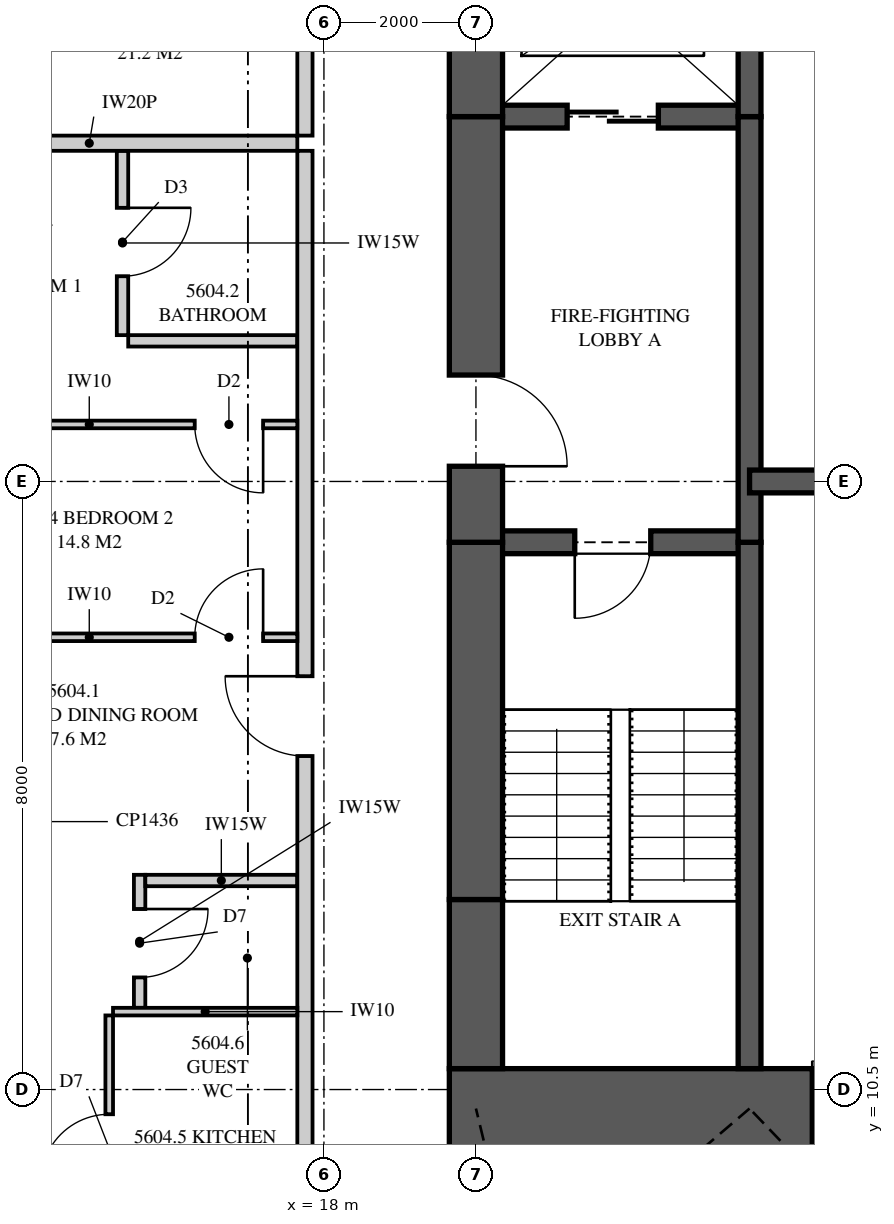
"""IFC4 building model, lengths in metres.
Left out: names, types, materials, properties, quantities, classifications, styles, units other than length and angle.
Written with IfcOpenShell. Run it as: python <this file> out.ifc"""

import sys

from ifc_helpers import new_model, si_unit, direction, frame, frame_2d, origin, place, context, subcontext, project, spatial, polyline, rectangle, outline, extrude, element, fill, save


model = new_model("IFC4")
c1 = context("Model", 3, precision=1e-05, world=origin(), true_north=direction((0.0, 1.0)))
c2 = subcontext(c1, "Body", "Model", "MODEL_VIEW")
j1 = project(units=[si_unit("LENGTHUNIT", "METRE"), si_unit("PLANEANGLEUNIT", "RADIAN")], contexts=[c1])
p1 = place(None, origin())
s1 = spatial("IfcSite", under=j1, at=p1, CompositionType="ELEMENT")
p2 = place(p1, origin())
s2 = spatial("IfcBuilding", under=s1, at=p2, CompositionType="ELEMENT")
p3 = place(p2, frame((0.0, 0.0, 204.6)))
s3 = spatial("IfcBuildingStorey", under=s2, at=p3, CompositionType="ELEMENT", Elevation=204.6)
p4 = place(p3, frame((19.65, 10.125, 0.0), z_axis=(0.0, 0.0, 1.0), x_axis=(1.0, 0.0, 0.0)))
e1 = element("IfcWall", 1, at=p4, inside=s3, PredefinedType="SHEAR", context=c2, shape_type="SweptSolid", body=[
    extrude(rectangle(XDim=6.35, YDim=1.3, at=frame_2d((3.175, 0.0))), origin(), (0.0, 0.0, 1.0), 3.35),
])
p5 = place(p4, frame((4.775, 0.0, 0.0)))
e2 = element("IfcOpeningElement", 2, at=p5, cuts=e1, PredefinedType="OPENING", context=c2, shape_type="SweptSolid", body=[
    extrude(rectangle(XDim=0.75, YDim=2.1, at=frame_2d((0.375, 1.05))), frame((0.0, 0.66, 0.0), z_axis=(0.0, -1.0, 0.0), x_axis=(1.0, 0.0, 0.0)), (0.0, 0.0, 1.0), 1.32),
])
p6 = place(p3, frame((20.0, 26.225, 0.0), z_axis=(0.0, 0.0, 1.0), x_axis=(0.0, -1.0, 0.0)))
e3 = element("IfcWall", 3, at=p6, inside=s3, PredefinedType="SHEAR", context=c2, shape_type="SweptSolid", body=[
    extrude(rectangle(XDim=2.925, YDim=0.7, at=frame_2d((1.462, 0.0))), origin(), (0.0, 0.0, 1.0), 3.35),
])
p7 = place(p3, frame((20.0, 23.3, 0.0), z_axis=(0.0, 0.0, 1.0), x_axis=(0.0, -1.0, 0.0)))
e4 = element("IfcWall", 4, at=p7, inside=s3, PredefinedType="SHEAR", context=c2, shape_type="SweptSolid", body=[
    extrude(rectangle(XDim=5.6, YDim=0.7, at=frame_2d((2.8, 0.0))), origin(), (0.0, 0.0, 1.0), 3.35),
])
p8 = place(p7, frame((3.4, 0.0, 0.0)))
e5 = element("IfcOpeningElement", 5, at=p8, cuts=e4, PredefinedType="OPENING", context=c2, shape_type="SweptSolid", body=[
    extrude(rectangle(XDim=1.2, YDim=2.2, at=frame_2d((0.6, 1.1))), frame((0.0, 0.36, 0.0), z_axis=(0.0, -1.0, 0.0), x_axis=(1.0, 0.0, 0.0)), (0.0, 0.0, 1.0), 0.72),
])
p9 = place(p3, frame((20.0, 17.7, 0.0), z_axis=(0.0, 0.0, 1.0), x_axis=(0.0, -1.0, 0.0)))
e6 = element("IfcWall", 6, at=p9, inside=s3, PredefinedType="SHEAR", context=c2, shape_type="SweptSolid", body=[
    extrude(rectangle(XDim=4.7, YDim=0.7, at=frame_2d((2.35, 0.0))), origin(), (0.0, 0.0, 1.0), 3.35),
])
p10 = place(p3, frame((20.0, 13.0, 0.0), z_axis=(0.0, 0.0, 1.0), x_axis=(0.0, -1.0, 0.0)))
e7 = element("IfcWall", 7, at=p10, inside=s3, PredefinedType="SHEAR", context=c2, shape_type="SweptSolid", body=[
    extrude(rectangle(XDim=2.225, YDim=0.7, at=frame_2d((1.113, 0.0))), origin(), (0.0, 0.0, 1.0), 3.35),
])
p11 = place(p3, frame((23.6, 10.775, 0.0), z_axis=(0.0, 0.0, 1.0), x_axis=(0.0, 1.0, 0.0)))
e8 = element("IfcWall", 8, at=p11, inside=s3, PredefinedType="SHEAR", context=c2, shape_type="SweptSolid", body=[
    extrude(rectangle(XDim=6.925, YDim=0.3, at=frame_2d((3.462, 0.0))), origin(), (0.0, 0.0, 1.0), 3.35),
])
p12 = place(p3, frame((23.6, 17.7, 0.0), z_axis=(0.0, 0.0, 1.0), x_axis=(0.0, 1.0, 0.0)))
e9 = element("IfcWall", 9, at=p12, inside=s3, PredefinedType="SHEAR", context=c2, shape_type="SweptSolid", body=[
    extrude(rectangle(XDim=5.6, YDim=0.3, at=frame_2d((2.8, 0.0))), origin(), (0.0, 0.0, 1.0), 3.35),
])
p13 = place(p3, frame((23.6, 23.3, 0.0), z_axis=(0.0, 0.0, 1.0), x_axis=(0.0, 1.0, 0.0)))
e10 = element("IfcWall", 10, at=p13, inside=s3, PredefinedType="SHEAR", context=c2, shape_type="SweptSolid", body=[
    extrude(rectangle(XDim=2.925, YDim=0.3, at=frame_2d((1.462, 0.0))), origin(), (0.0, 0.0, 1.0), 3.35),
])
p14 = place(p3, frame((20.0, 17.7, 0.0), z_axis=(0.0, 0.0, 1.0), x_axis=(1.0, 0.0, 0.0)))
e11 = element("IfcWall", 11, at=p14, inside=s3, PredefinedType="SHEAR", context=c2, shape_type="SweptSolid", body=[
    extrude(rectangle(XDim=3.6, YDim=0.3, at=frame_2d((1.8, 0.0))), origin(), (0.0, 0.0, 1.0), 3.35),
])
p15 = place(p14, frame((1.3, 0.0, 0.0)))
e12 = element("IfcOpeningElement", 12, at=p15, cuts=e11, PredefinedType="OPENING", context=c2, shape_type="SweptSolid", body=[
    extrude(rectangle(XDim=1.0, YDim=2.1, at=frame_2d((0.5, 1.05))), frame((0.0, 0.16, 0.0), z_axis=(0.0, -1.0, 0.0), x_axis=(1.0, 0.0, 0.0)), (0.0, 0.0, 1.0), 0.32),
])
p16 = place(p3, frame((20.0, 23.3, 0.0), z_axis=(0.0, 0.0, 1.0), x_axis=(1.0, 0.0, 0.0)))
e13 = element("IfcWall", 13, at=p16, inside=s3, PredefinedType="SHEAR", context=c2, shape_type="SweptSolid", body=[
    extrude(rectangle(XDim=3.6, YDim=0.3, at=frame_2d((1.8, 0.0))), origin(), (0.0, 0.0, 1.0), 3.35),
])
p17 = place(p16, frame((1.2, 0.0, 0.0)))
e14 = element("IfcOpeningElement", 14, at=p17, cuts=e13, PredefinedType="OPENING", context=c2, shape_type="SweptSolid", body=[
    extrude(rectangle(XDim=1.2, YDim=2.1, at=frame_2d((0.6, 1.05))), frame((0.0, 0.16, 0.0), z_axis=(0.0, -1.0, 0.0), x_axis=(1.0, 0.0, 0.0)), (0.0, 0.0, 1.0), 0.32),
])
p18 = place(p3, frame((23.6, 18.5, 0.0), z_axis=(0.0, 0.0, 1.0), x_axis=(1.0, 0.0, 0.0)))
e15 = element("IfcWall", 15, at=p18, inside=s3, PredefinedType="SHEAR", context=c2, shape_type="SweptSolid", body=[
    extrude(rectangle(XDim=2.4, YDim=0.3, at=frame_2d((1.2, 0.0))), origin(), (0.0, 0.0, 1.0), 3.35),
])
p19 = place(p3, frame((12.175, 22.95, 0.0), z_axis=(0.0, 0.0, 1.0), x_axis=(1.0, 0.0, 0.0)))
e16 = element("IfcWall", 16, at=p19, inside=s3, PredefinedType="PARTITIONING", context=c2, shape_type="SweptSolid", body=[
    extrude(outline(polyline([(0.0, 0.0), (5.475, 0.0), (5.475, 3.07), (1.674, 3.07), (1.674, 3.014), (1.63, 2.924), (1.275, 2.895), (1.275, 2.07), (0.275, 2.07), (0.275, 3.07), (0.0, 3.07), (0.0, 0.0)])), frame((0.0, 0.1, 0.0), z_axis=(0.0, -1.0, 0.0), x_axis=(1.0, 0.0, 0.0)), (0.0, 0.0, 1.0), 0.2),
])
p20 = place(p3, frame((17.75, 7.925, 0.0), z_axis=(0.0, 0.0, 1.0), x_axis=(0.0, 1.0, 0.0)))
e17 = element("IfcWall", 17, at=p20, inside=s3, PredefinedType="PARTITIONING", context=c2, shape_type="SweptSolid", body=[
    extrude(outline(polyline([(0.0, 0.0), (14.925, 0.0), (14.925, 3.07), (5.287, 3.07), (5.287, 2.595), (4.863, 2.595), (4.863, 3.07), (0.0, 3.07), (0.0, 0.0)])), frame((0.0, 0.1, 0.0), z_axis=(0.0, -1.0, 0.0), x_axis=(1.0, 0.0, 0.0)), (0.0, 0.0, 1.0), 0.2),
])
p21 = place(p20, frame((6.962, 0.0, 0.0)))
e18 = element("IfcOpeningElement", 18, at=p21, cuts=e17, PredefinedType="OPENING", context=c2, shape_type="SweptSolid", body=[
    extrude(rectangle(XDim=1.05, YDim=2.2, at=frame_2d((0.525, 1.1))), frame((0.0, 0.11, 0.0), z_axis=(0.0, -1.0, 0.0), x_axis=(1.0, 0.0, 0.0)), (0.0, 0.0, 1.0), 0.22),
])
p22 = place(p3, frame((15.35, 20.425, 0.0), z_axis=(0.0, 0.0, 1.0), x_axis=(0.0, 1.0, 0.0)))
e19 = element("IfcWall", 19, at=p22, inside=s3, PredefinedType="PLUMBINGWALL", context=c2, shape_type="SweptSolid", body=[
    extrude(rectangle(XDim=2.425, YDim=0.15, at=frame_2d((1.212, 0.0))), origin(), (0.0, 0.0, 1.0), 3.07),
])
p23 = place(p22, frame((0.775, 0.0, 0.0)))
e20 = element("IfcOpeningElement", 20, at=p23, cuts=e19, PredefinedType="OPENING", context=c2, shape_type="SweptSolid", body=[
    extrude(rectangle(XDim=0.9, YDim=2.1, at=frame_2d((0.45, 1.05))), frame((0.0, 0.085, 0.0), z_axis=(0.0, -1.0, 0.0), x_axis=(1.0, 0.0, 0.0)), (0.0, 0.0, 1.0), 0.17),
])
p24 = place(p3, frame((15.425, 20.35, 0.0), z_axis=(0.0, 0.0, 1.0), x_axis=(1.0, 0.0, 0.0)))
e21 = element("IfcWall", 21, at=p24, inside=s3, PredefinedType="PLUMBINGWALL", context=c2, shape_type="SweptSolid", body=[
    extrude(rectangle(XDim=2.225, YDim=0.15, at=frame_2d((1.112, 0.0))), origin(), (0.0, 0.0, 1.0), 3.07),
])
p25 = place(p3, frame((12.175, 19.25, 0.0), z_axis=(0.0, 0.0, 1.0), x_axis=(1.0, 0.0, 0.0)))
e22 = element("IfcWall", 22, at=p25, inside=s3, PredefinedType="PARTITIONING", context=c2, shape_type="SweptSolid", body=[
    extrude(outline(polyline([(0.0, 0.0), (5.475, 0.0), (5.475, 3.07), (1.275, 3.07), (1.275, 2.07), (0.275, 2.07), (0.275, 3.07), (0.0, 3.07), (0.0, 0.0)])), frame((0.0, 0.05, 0.0), z_axis=(0.0, -1.0, 0.0), x_axis=(1.0, 0.0, 0.0)), (0.0, 0.0, 1.0), 0.1),
])
p26 = place(p25, frame((4.125, 0.0, 0.0)))
e23 = element("IfcOpeningElement", 23, at=p26, cuts=e22, PredefinedType="OPENING", context=c2, shape_type="SweptSolid", body=[
    extrude(rectangle(XDim=0.9, YDim=2.1, at=frame_2d((0.45, 1.05))), frame((0.0, 0.06, 0.0), z_axis=(0.0, -1.0, 0.0), x_axis=(1.0, 0.0, 0.0)), (0.0, 0.0, 1.0), 0.12),
])
p27 = place(p3, frame((12.175, 16.45, 0.0), z_axis=(0.0, 0.0, 1.0), x_axis=(1.0, 0.0, 0.0)))
e24 = element("IfcWall", 24, at=p27, inside=s3, PredefinedType="PARTITIONING", context=c2, shape_type="SweptSolid", body=[
    extrude(outline(polyline([(0.0, 0.0), (5.475, 0.0), (5.475, 3.07), (1.275, 3.07), (1.275, 2.07), (0.275, 2.07), (0.275, 3.07), (0.0, 3.07), (0.0, 0.0)])), frame((0.0, 0.05, 0.0), z_axis=(0.0, -1.0, 0.0), x_axis=(1.0, 0.0, 0.0)), (0.0, 0.0, 1.0), 0.1),
])
p28 = place(p27, frame((4.125, 0.0, 0.0)))
e25 = element("IfcOpeningElement", 25, at=p28, cuts=e24, PredefinedType="OPENING", context=c2, shape_type="SweptSolid", body=[
    extrude(rectangle(XDim=0.9, YDim=2.1, at=frame_2d((0.45, 1.05))), frame((0.0, 0.06, 0.0), z_axis=(0.0, -1.0, 0.0), x_axis=(1.0, 0.0, 0.0)), (0.0, 0.0, 1.0), 0.12),
])
p29 = place(p3, frame((15.175, 7.925, 0.0), z_axis=(0.0, 0.0, 1.0), x_axis=(0.0, 1.0, 0.0)))
e26 = element("IfcWall", 26, at=p29, inside=s3, PredefinedType="PARTITIONING", context=c2, shape_type="SweptSolid", body=[
    extrude(rectangle(XDim=3.55, YDim=0.1, at=frame_2d((1.775, 0.0))), origin(), (0.0, 0.0, 1.0), 3.07),
])
p30 = place(p29, frame((1.35, 0.0, 0.0)))
e27 = element("IfcOpeningElement", 27, at=p30, cuts=e26, PredefinedType="OPENING", context=c2, shape_type="SweptSolid", body=[
    extrude(rectangle(XDim=0.9, YDim=2.1, at=frame_2d((0.45, 1.05))), frame((0.0, 0.06, 0.0), z_axis=(0.0, -1.0, 0.0), x_axis=(1.0, 0.0, 0.0)), (0.0, 0.0, 1.0), 0.12),
])
p31 = place(p3, frame((15.225, 11.525, 0.0), z_axis=(0.0, 0.0, 1.0), x_axis=(1.0, 0.0, 0.0)))
e28 = element("IfcWall", 28, at=p31, inside=s3, PredefinedType="PARTITIONING", context=c2, shape_type="SweptSolid", body=[
    extrude(rectangle(XDim=2.425, YDim=0.1, at=frame_2d((1.212, 0.0))), origin(), (0.0, 0.0, 1.0), 3.07),
])
p32 = place(p3, frame((17.75, 23.05, 0.0), z_axis=(0.0, 0.0, 1.0), x_axis=(0.0, 1.0, 0.0)))
e29 = element("IfcWall", 29, at=p32, inside=s3, PredefinedType="PARTITIONING", context=c2, shape_type="SweptSolid", body=[
    extrude(outline(polyline([(0.0, 0.0), (6.025, 0.0), (6.025, 3.07), (2.162, 3.07), (2.162, 2.595), (1.738, 2.595), (1.738, 3.07), (0.0, 3.07), (0.0, 0.0)])), frame((0.0, 0.1, 0.0), z_axis=(0.0, -1.0, 0.0), x_axis=(1.0, 0.0, 0.0)), (0.0, 0.0, 1.0), 0.2),
])
p33 = place(p32, frame((2.512, 0.0, 0.0)))
e30 = element("IfcOpeningElement", 30, at=p33, cuts=e29, PredefinedType="OPENING", context=c2, shape_type="SweptSolid", body=[
    extrude(rectangle(XDim=1.05, YDim=2.2, at=frame_2d((0.525, 1.1))), frame((0.0, 0.11, 0.0), z_axis=(0.0, -1.0, 0.0), x_axis=(1.0, 0.0, 0.0)), (0.0, 0.0, 1.0), 0.22),
])
p34 = place(p3, frame((15.575, 11.575, 0.0), z_axis=(0.0, 0.0, 1.0), x_axis=(0.0, 1.0, 0.0)))
e31 = element("IfcWall", 31, at=p34, inside=s3, PredefinedType="PLUMBINGWALL", context=c2, shape_type="SweptSolid", body=[
    extrude(outline(polyline([(0.0, 0.0), (1.75, 0.0), (1.75, 3.07), (1.637, 3.07), (1.637, 2.595), (1.213, 2.595), (1.213, 3.07), (0.0, 3.07), (0.0, 0.0)])), frame((0.0, 0.075, 0.0), z_axis=(0.0, -1.0, 0.0), x_axis=(1.0, 0.0, 0.0)), (0.0, 0.0, 1.0), 0.15),
])
p35 = place(p34, frame((0.4, 0.0, 0.0)))
e32 = element("IfcOpeningElement", 32, at=p35, cuts=e31, PredefinedType="OPENING", context=c2, shape_type="SweptSolid", body=[
    extrude(rectangle(XDim=0.9, YDim=2.1, at=frame_2d((0.45, 1.05))), frame((0.0, 0.085, 0.0), z_axis=(0.0, -1.0, 0.0), x_axis=(1.0, 0.0, 0.0)), (0.0, 0.0, 1.0), 0.17),
])
p36 = place(p3, frame((17.65, 13.25, 0.0), z_axis=(0.0, 0.0, 1.0), x_axis=(-1.0, 0.0, 0.0)))
e33 = element("IfcWall", 33, at=p36, inside=s3, PredefinedType="PLUMBINGWALL", context=c2, shape_type="SweptSolid", body=[
    extrude(rectangle(XDim=2.0, YDim=0.15, at=frame_2d((1.0, 0.0))), origin(), (0.0, 0.0, 1.0), 2.595),
])
p37 = place(p21, origin())
e34 = element("IfcDoor", 34, at=p37, inside=s3, OperationType="SINGLE_SWING_RIGHT", PredefinedType="DOOR", context=c2, shape_type="SweptSolid", body=[
    extrude(rectangle(XDim=1.05, YDim=2.2, at=frame_2d((0.525, 1.1))), frame((0.0, 0.025, 0.0), z_axis=(0.0, -1.0, 0.0), x_axis=(1.0, 0.0, 0.0)), (0.0, 0.0, 1.0), 0.05),
])
fill(e18, e34)
p38 = place(p23, frame((0.9, 0.0, 0.0), z_axis=(0.0, 0.0, 1.0), x_axis=(-1.0, 0.0, 0.0)))
e35 = element("IfcDoor", 35, at=p38, inside=s3, OperationType="SINGLE_SWING_LEFT", PredefinedType="DOOR", context=c2, shape_type="SweptSolid", body=[
    extrude(rectangle(XDim=0.9, YDim=2.1, at=frame_2d((0.45, 1.05))), frame((0.0, 0.025, 0.0), z_axis=(0.0, -1.0, 0.0), x_axis=(1.0, 0.0, 0.0)), (0.0, 0.0, 1.0), 0.05),
])
fill(e20, e35)
p39 = place(p26, frame((0.9, 0.0, 0.0), z_axis=(0.0, 0.0, 1.0), x_axis=(-1.0, 0.0, 0.0)))
e36 = element("IfcDoor", 36, at=p39, inside=s3, OperationType="SINGLE_SWING_LEFT", PredefinedType="DOOR", context=c2, shape_type="SweptSolid", body=[
    extrude(rectangle(XDim=0.9, YDim=2.1, at=frame_2d((0.45, 1.05))), frame((0.0, 0.025, 0.0), z_axis=(0.0, -1.0, 0.0), x_axis=(1.0, 0.0, 0.0)), (0.0, 0.0, 1.0), 0.05),
])
fill(e23, e36)
p40 = place(p28, origin())
e37 = element("IfcDoor", 37, at=p40, inside=s3, OperationType="SINGLE_SWING_RIGHT", PredefinedType="DOOR", context=c2, shape_type="SweptSolid", body=[
    extrude(rectangle(XDim=0.9, YDim=2.1, at=frame_2d((0.45, 1.05))), frame((0.0, 0.025, 0.0), z_axis=(0.0, -1.0, 0.0), x_axis=(1.0, 0.0, 0.0)), (0.0, 0.0, 1.0), 0.05),
])
fill(e25, e37)
p41 = place(p30, origin())
e38 = element("IfcDoor", 38, at=p41, inside=s3, OperationType="SINGLE_SWING_LEFT", PredefinedType="DOOR", context=c2, shape_type="SweptSolid", body=[
    extrude(rectangle(XDim=0.9, YDim=2.1, at=frame_2d((0.45, 1.05))), frame((0.0, 0.025, 0.0), z_axis=(0.0, -1.0, 0.0), x_axis=(1.0, 0.0, 0.0)), (0.0, 0.0, 1.0), 0.05),
])
fill(e27, e38)
p42 = place(p35, frame((0.9, 0.0, 0.0), z_axis=(0.0, 0.0, 1.0), x_axis=(-1.0, 0.0, 0.0)))
e39 = element("IfcDoor", 39, at=p42, inside=s3, OperationType="SINGLE_SWING_LEFT", PredefinedType="DOOR", context=c2, shape_type="SweptSolid", body=[
    extrude(rectangle(XDim=0.9, YDim=2.1, at=frame_2d((0.45, 1.05))), frame((0.0, 0.025, 0.0), z_axis=(0.0, -1.0, 0.0), x_axis=(1.0, 0.0, 0.0)), (0.0, 0.0, 1.0), 0.05),
])
fill(e32, e39)
p43 = place(p15, frame((1.0, 0.0, 0.0), z_axis=(0.0, 0.0, 1.0), x_axis=(-1.0, 0.0, 0.0)))
e40 = element("IfcDoor", 40, at=p43, inside=s3, OperationType="SINGLE_SWING_RIGHT", PredefinedType="DOOR", context=c2, shape_type="SweptSolid", body=[
    extrude(rectangle(XDim=1.0, YDim=2.1, at=frame_2d((0.5, 1.05))), frame((0.0, 0.025, 0.0), z_axis=(0.0, -1.0, 0.0), x_axis=(1.0, 0.0, 0.0)), (0.0, 0.0, 1.0), 0.05),
])
fill(e12, e40)
p44 = place(p8, origin())
e41 = element("IfcDoor", 41, at=p44, inside=s3, OperationType="SINGLE_SWING_RIGHT", PredefinedType="DOOR", context=c2, shape_type="SweptSolid", body=[
    extrude(rectangle(XDim=1.2, YDim=2.2, at=frame_2d((0.6, 1.1))), frame((0.0, 0.025, 0.0), z_axis=(0.0, -1.0, 0.0), x_axis=(1.0, 0.0, 0.0)), (0.0, 0.0, 1.0), 0.05),
])
fill(e5, e41)
p45 = place(p17, origin())
e42 = element("IfcDoor", 42, at=p45, inside=s3, OperationType="SLIDING_TO_LEFT", PredefinedType="DOOR", context=c2, shape_type="SweptSolid", body=[
    extrude(rectangle(XDim=1.2, YDim=2.1, at=frame_2d((0.6, 1.05))), frame((0.0, 0.025, 0.0), z_axis=(0.0, -1.0, 0.0), x_axis=(1.0, 0.0, 0.0)), (0.0, 0.0, 1.0), 0.05),
])
fill(e14, e42)
p46 = place(p5, origin())
e43 = element("IfcDoor", 43, at=p46, inside=s3, OperationType="SINGLE_SWING_LEFT", PredefinedType="DOOR", context=c2, shape_type="SweptSolid", body=[
    extrude(rectangle(XDim=0.75, YDim=2.1, at=frame_2d((0.375, 1.05))), frame((0.0, 0.025, 0.0), z_axis=(0.0, -1.0, 0.0), x_axis=(1.0, 0.0, 0.0)), (0.0, 0.0, 1.0), 0.05),
])
fill(e2, e43)
save(model, sys.argv[1])
